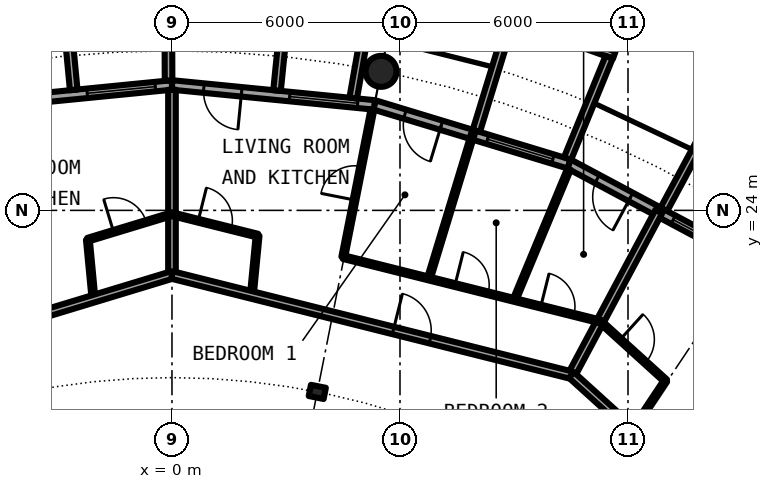
"""IFC4 building model, lengths in metres.
Left out: names, types, materials, properties, quantities, classifications, styles, units other than length and angle.
Written with IfcOpenShell. Run it as: python <this file> out.ifc"""

import sys

from ifc_helpers import new_model, si_unit, direction, frame, frame_2d, origin, origin_2d, place, context, subcontext, project, spatial, rectangle, circle, hollow_circle, i_section, extrude, element, fill, save


model = new_model("IFC4")
c1 = context("Model", 3, precision=1e-05, world=origin(), true_north=direction((0.0, 1.0)))
c2 = subcontext(c1, "Body", "Model", "MODEL_VIEW")
j1 = project(units=[si_unit("LENGTHUNIT", "METRE"), si_unit("PLANEANGLEUNIT", "RADIAN")], contexts=[c1])
p1 = place(None, origin())
s1 = spatial("IfcSite", under=j1, at=p1, CompositionType="ELEMENT")
p2 = place(p1, origin())
s2 = spatial("IfcBuilding", under=s1, at=p2, CompositionType="ELEMENT")
p3 = place(p2, frame((0.0, 0.0, 199.35)))
s3 = spatial("IfcBuildingStorey", under=s2, at=p3, CompositionType="ELEMENT", Elevation=199.35)
p4 = place(p3, frame((5.501, 27.658, 0.0), z_axis=(0.0, 0.0, 1.0), x_axis=(1.0, 0.0, 0.0)))
e1 = element("IfcColumn", 1, at=p4, inside=s3, PredefinedType="COLUMN", context=c2, shape_type="SweptSolid", body=[
    extrude(hollow_circle(Radius=0.406, WallThickness=0.03, at=origin_2d()), origin(), (0.0, 0.0, 1.0), 3.05),
])
p5 = place(p3, frame((3.824, 19.223, 0.0), z_axis=(0.0, 0.0, 1.0), x_axis=(0.195090322016, 0.980785280403, 0.0)))
e2 = element("IfcColumn", 2, at=p5, inside=s3, PredefinedType="COLUMN", context=c2, shape_type="SweptSolid", body=[
    extrude(i_section(OverallWidth=0.3, OverallDepth=0.4, WebThickness=0.013, FlangeThickness=0.024, FilletRadius=0.027, at=origin_2d()), origin(), (0.0, 0.0, 1.0), 3.05),
])
p6 = place(p3, frame((15.167, 22.699, 0.0), z_axis=(0.0, 0.0, 1.0), x_axis=(-0.881915646801, 0.471407246368, 0.0)))
e3 = element("IfcWall", 3, at=p6, inside=s3, PredefinedType="SOLIDWALL", context=c2, shape_type="SweptSolid", body=[
    extrude(rectangle(XDim=5.352, YDim=0.25, at=frame_2d((2.676, 0.0))), origin(), (0.0, 0.0, 1.0), 2.7),
])
p7 = place(p6, frame((0.441, 0.0, 0.3)))
e4 = element("IfcOpeningElement", 4, at=p7, cuts=e3, PredefinedType="OPENING", context=c2, shape_type="SweptSolid", body=[
    extrude(rectangle(XDim=1.8, YDim=2.1, at=frame_2d((0.9, 1.05))), frame((0.0, 0.135, 0.0), z_axis=(0.0, -1.0, 0.0), x_axis=(1.0, 0.0, 0.0)), (0.0, 0.0, 1.0), 0.27),
])
p8 = place(p6, frame((3.51, 0.0, 0.0)))
e5 = element("IfcOpeningElement", 5, at=p8, cuts=e3, PredefinedType="OPENING", context=c2, shape_type="SweptSolid", body=[
    extrude(rectangle(XDim=1.0, YDim=2.2, at=frame_2d((0.5, 1.1))), frame((0.0, 0.135, 0.0), z_axis=(0.0, -1.0, 0.0), x_axis=(1.0, 0.0, 0.0)), (0.0, 0.0, 1.0), 0.27),
])
p9 = place(p3, frame((12.945, 24.029, -0.03), z_axis=(0.0, 0.0, 1.0), x_axis=(0.474424310775, 0.88029629861, 0.0)))
e6 = element("IfcWall", 6, at=p9, inside=s3, PredefinedType="SOLIDWALL", context=c2, shape_type="SweptSolid", body=[
    extrude(rectangle(XDim=3.006, YDim=0.2, at=frame_2d((1.503, 0.0))), origin(), (0.0, 0.0, 1.0), 2.73),
])
p10 = place(p3, frame((10.447, 25.222, 0.0), z_axis=(0.0, 0.0, 1.0), x_axis=(-0.956965678721, 0.290201119486, 0.0)))
e7 = element("IfcWall", 7, at=p10, inside=s3, PredefinedType="SOLIDWALL", context=c2, shape_type="SweptSolid", body=[
    extrude(rectangle(XDim=5.351, YDim=0.25, at=frame_2d((2.676, 0.0))), origin(), (0.0, 0.0, 1.0), 2.7),
])
p11 = place(p10, frame((0.441, 0.0, 0.3)))
e8 = element("IfcOpeningElement", 8, at=p11, cuts=e7, PredefinedType="OPENING", context=c2, shape_type="SweptSolid", body=[
    extrude(rectangle(XDim=1.8, YDim=2.1, at=frame_2d((0.9, 1.05))), frame((0.0, 0.135, 0.0), z_axis=(0.0, -1.0, 0.0), x_axis=(1.0, 0.0, 0.0)), (0.0, 0.0, 1.0), 0.27),
])
p12 = place(p10, frame((3.51, 0.0, 0.0)))
e9 = element("IfcOpeningElement", 9, at=p12, cuts=e7, PredefinedType="OPENING", context=c2, shape_type="SweptSolid", body=[
    extrude(rectangle(XDim=1.0, YDim=2.2, at=frame_2d((0.5, 1.1))), frame((0.0, 0.135, 0.0), z_axis=(0.0, -1.0, 0.0), x_axis=(1.0, 0.0, 0.0)), (0.0, 0.0, 1.0), 0.27),
])
p13 = place(p3, frame((11.638, 28.084, -0.03), z_axis=(0.0, 0.0, 1.0), x_axis=(-0.941461077774, 0.337121697664, 0.0)))
e10 = element("IfcWall", 10, at=p13, inside=s3, PredefinedType="SOLIDWALL", context=c2, shape_type="SweptSolid", body=[
    extrude(rectangle(XDim=2.993, YDim=0.2, at=frame_2d((1.497, 0.0))), origin(), (0.0, 0.0, 1.0), 2.73),
])
p14 = place(p13, frame((0.457, 0.0, 0.33)))
e11 = element("IfcOpeningElement", 11, at=p14, cuts=e10, PredefinedType="OPENING", context=c2, shape_type="SweptSolid", body=[
    extrude(circle(Radius=1.04, at=frame_2d((1.04, 1.04))), frame((0.0, 0.11, 0.0), z_axis=(0.0, -1.0, 0.0), x_axis=(1.0, 0.0, 0.0)), (0.0, 0.0, 1.0), 0.22),
])
p15 = place(p3, frame((10.409, 25.364, -0.03), z_axis=(0.0, 0.0, 1.0), x_axis=(0.379509886562, 0.925187681501, 0.0)))
e12 = element("IfcWall", 12, at=p15, inside=s3, PredefinedType="SOLIDWALL", context=c2, shape_type="SweptSolid", body=[
    extrude(rectangle(XDim=2.883, YDim=0.2, at=frame_2d((1.441, 0.0))), origin(), (0.0, 0.0, 1.0), 2.73),
])
p16 = place(p3, frame((8.009, 26.092, -0.03), z_axis=(0.0, 0.0, 1.0), x_axis=(0.293406695073, 0.955987715029, 0.0)))
e13 = element("IfcWall", 13, at=p16, inside=s3, PredefinedType="SOLIDWALL", context=c2, shape_type="SweptSolid", body=[
    extrude(rectangle(XDim=3.006, YDim=0.2, at=frame_2d((1.503, 0.0))), origin(), (0.0, 0.0, 1.0), 2.73),
])
p17 = place(p3, frame((5.326, 26.775, 0.0), z_axis=(0.0, 0.0, 1.0), x_axis=(-0.995173996315, 0.098126026407, 0.0)))
e14 = element("IfcWall", 14, at=p17, inside=s3, PredefinedType="SOLIDWALL", context=c2, shape_type="SweptSolid", body=[
    extrude(rectangle(XDim=5.352, YDim=0.25, at=frame_2d((2.676, 0.0))), origin(), (0.0, 0.0, 1.0), 2.7),
])
p18 = place(p17, frame((0.441, 0.0, 0.3)))
e15 = element("IfcOpeningElement", 15, at=p18, cuts=e14, PredefinedType="OPENING", context=c2, shape_type="SweptSolid", body=[
    extrude(rectangle(XDim=1.8, YDim=2.1, at=frame_2d((0.9, 1.05))), frame((0.0, 0.135, 0.0), z_axis=(0.0, -1.0, 0.0), x_axis=(1.0, 0.0, 0.0)), (0.0, 0.0, 1.0), 0.27),
])
p19 = place(p17, frame((3.51, 0.0, 0.0)))
e16 = element("IfcOpeningElement", 16, at=p19, cuts=e14, PredefinedType="OPENING", context=c2, shape_type="SweptSolid", body=[
    extrude(rectangle(XDim=1.0, YDim=2.2, at=frame_2d((0.5, 1.1))), frame((0.0, 0.135, 0.0), z_axis=(0.0, -1.0, 0.0), x_axis=(1.0, 0.0, 0.0)), (0.0, 0.0, 1.0), 0.27),
])
p20 = place(p3, frame((4.769, 26.956, -0.03), z_axis=(0.0, 0.0, 1.0), x_axis=(0.174056778901, 0.984735618183, 0.0)))
e17 = element("IfcWall", 17, at=p20, inside=s3, PredefinedType="SOLIDWALL", context=c2, shape_type="SweptSolid", body=[
    extrude(rectangle(XDim=2.925, YDim=0.2, at=frame_2d((1.462, 0.0))), origin(), (0.0, 0.0, 1.0), 2.73),
])
p21 = place(p3, frame((2.764, 27.153, -0.03), z_axis=(0.0, 0.0, 1.0), x_axis=(0.101505487237, 0.994834979311, 0.0)))
e18 = element("IfcWall", 18, at=p21, inside=s3, PredefinedType="SOLIDWALL", context=c2, shape_type="SweptSolid", body=[
    extrude(rectangle(XDim=3.007, YDim=0.2, at=frame_2d((1.503, 0.0))), origin(), (0.0, 0.0, 1.0), 2.73),
])
p22 = place(p3, frame((0.0, 27.3, 0.0), z_axis=(0.0, 0.0, 1.0), x_axis=(-0.995173996315, -0.098126026407, 0.0)))
e19 = element("IfcWall", 19, at=p22, inside=s3, PredefinedType="SOLIDWALL", context=c2, shape_type="SweptSolid", body=[
    extrude(rectangle(XDim=5.352, YDim=0.25, at=frame_2d((2.676, 0.0))), origin(), (0.0, 0.0, 1.0), 2.7),
])
p23 = place(p22, frame((0.441, 0.0, 0.3)))
e20 = element("IfcOpeningElement", 20, at=p23, cuts=e19, PredefinedType="OPENING", context=c2, shape_type="SweptSolid", body=[
    extrude(rectangle(XDim=1.8, YDim=2.1, at=frame_2d((0.9, 1.05))), frame((0.0, 0.135, 0.0), z_axis=(0.0, -1.0, 0.0), x_axis=(1.0, 0.0, 0.0)), (0.0, 0.0, 1.0), 0.27),
])
p24 = place(p22, frame((3.51, 0.0, 0.0)))
e21 = element("IfcOpeningElement", 21, at=p24, cuts=e19, PredefinedType="OPENING", context=c2, shape_type="SweptSolid", body=[
    extrude(rectangle(XDim=1.0, YDim=2.2, at=frame_2d((0.5, 1.1))), frame((0.0, 0.135, 0.0), z_axis=(0.0, -1.0, 0.0), x_axis=(1.0, 0.0, 0.0)), (0.0, 0.0, 1.0), 0.27),
])
p25 = place(p3, frame((-0.09, 27.417, -0.03), z_axis=(0.0, 0.0, 1.0), x_axis=(-0.00347308367, 0.999993968827, 0.0)))
e22 = element("IfcWall", 22, at=p25, inside=s3, PredefinedType="SOLIDWALL", context=c2, shape_type="SweptSolid", body=[
    extrude(rectangle(XDim=2.882, YDim=0.2, at=frame_2d((1.441, 0.0))), origin(), (0.0, 0.0, 1.0), 2.73),
])
p26 = place(p3, frame((-2.586, 27.171, -0.03), z_axis=(0.0, 0.0, 1.0), x_axis=(-0.094548432284, 0.995520262954, 0.0)))
e23 = element("IfcWall", 23, at=p26, inside=s3, PredefinedType="SOLIDWALL", context=c2, shape_type="SweptSolid", body=[
    extrude(rectangle(XDim=3.006, YDim=0.2, at=frame_2d((1.503, 0.0))), origin(), (0.0, 0.0, 1.0), 2.73),
])
p27 = place(p3, frame((-2.213, 23.229, 0.0), z_axis=(0.0, 0.0, 1.0), x_axis=(0.094720578196, -0.995503898569, 0.0)))
e24 = element("IfcWall", 24, at=p27, inside=s3, PredefinedType="PARTITIONING", context=c2, shape_type="SweptSolid", body=[
    extrude(rectangle(XDim=1.562, YDim=0.1, at=frame_2d((0.781, 0.0))), origin(), (0.0, 0.0, 1.0), 2.7),
])
p28 = place(p3, frame((0.0, 22.3, 0.0), z_axis=(0.0, 0.0, 1.0), x_axis=(0.0, 1.0, 0.0)))
e25 = element("IfcWall", 25, at=p28, inside=s3, PredefinedType="PARTITIONING", context=c2, shape_type="SweptSolid", body=[
    extrude(rectangle(XDim=4.875, YDim=0.2, at=frame_2d((2.438, 0.0))), origin(), (0.0, 0.0, 1.0), 2.7),
])
p29 = place(p3, frame((2.102, 21.773, 0.0), z_axis=(0.0, 0.0, 1.0), x_axis=(0.09608568494, 0.995373066317, 0.0)))
e26 = element("IfcWall", 26, at=p29, inside=s3, PredefinedType="PARTITIONING", context=c2, shape_type="SweptSolid", body=[
    extrude(rectangle(XDim=1.57, YDim=0.1, at=frame_2d((0.785, 0.0))), origin(), (0.0, 0.0, 1.0), 2.7),
])
p30 = place(p3, frame((4.507, 22.771, 0.0), z_axis=(0.0, 0.0, 1.0), x_axis=(0.194030211642, 0.980995554001, 0.0)))
e27 = element("IfcWall", 27, at=p30, inside=s3, PredefinedType="PARTITIONING", context=c2, shape_type="SweptSolid", body=[
    extrude(rectangle(XDim=3.962, YDim=0.1, at=frame_2d((1.981, 0.0))), origin(), (0.0, 0.0, 1.0), 2.7),
])
p31 = place(p30, frame((1.531, 0.0, 0.0)))
e28 = element("IfcOpeningElement", 28, at=p31, cuts=e27, PredefinedType="OPENING", context=c2, shape_type="SweptSolid", body=[
    extrude(rectangle(XDim=0.9, YDim=2.3, at=frame_2d((0.45, 1.15))), frame((0.0, 0.06, 0.0), z_axis=(0.0, -1.0, 0.0), x_axis=(1.0, 0.0, 0.0)), (0.0, 0.0, 1.0), 0.12),
])
p32 = place(p3, frame((6.76, 22.207, 0.0), z_axis=(0.0, 0.0, 1.0), x_axis=(0.291291575636, 0.956634317785, 0.0)))
e29 = element("IfcWall", 29, at=p32, inside=s3, PredefinedType="PARTITIONING", context=c2, shape_type="SweptSolid", body=[
    extrude(rectangle(XDim=3.962, YDim=0.1, at=frame_2d((1.981, 0.0))), origin(), (0.0, 0.0, 1.0), 2.7),
])
p33 = place(p3, frame((9.013, 21.642, 0.0), z_axis=(0.0, 0.0, 1.0), x_axis=(0.384420204655, 0.923158223845, 0.0)))
e30 = element("IfcWall", 30, at=p33, inside=s3, PredefinedType="PARTITIONING", context=c2, shape_type="SweptSolid", body=[
    extrude(rectangle(XDim=3.73, YDim=0.1, at=frame_2d((1.865, 0.0))), origin(), (0.0, 0.0, 1.0), 2.7),
])
p34 = place(p3, frame((10.512, 19.667, 0.0), z_axis=(0.0, 0.0, 1.0), x_axis=(0.471271812246, 0.881988026553, 0.0)))
e31 = element("IfcWall", 31, at=p34, inside=s3, PredefinedType="PARTITIONING", context=c2, shape_type="SweptSolid", body=[
    extrude(rectangle(XDim=4.874, YDim=0.2, at=frame_2d((2.437, 0.0))), origin(), (0.0, 0.0, 1.0), 2.7),
])
p35 = place(p3, frame((12.118, 18.211, 0.0), z_axis=(0.0, 0.0, 1.0), x_axis=(0.554125989098, 0.832432813028, 0.0)))
e32 = element("IfcWall", 32, at=p35, inside=s3, PredefinedType="PARTITIONING", context=c2, shape_type="SweptSolid", body=[
    extrude(rectangle(XDim=1.57, YDim=0.1, at=frame_2d((0.785, 0.0))), origin(), (0.0, 0.0, 1.0), 2.7),
])
p36 = place(p3, frame((-12.389, 18.542, 0.0), z_axis=(0.0, 0.0, 1.0), x_axis=(0.956942051091, 0.290279022415, 0.0)))
e33 = element("IfcWall", 33, at=p36, inside=s3, PredefinedType="PARTITIONING", context=c2, shape_type="SweptSolid", body=[
    extrude(rectangle(XDim=12.946, YDim=0.2, at=frame_2d((6.473, 0.0))), origin(), (0.0, 0.0, 1.0), 2.7),
])
p37 = place(p36, frame((4.895, 0.0, 0.0)))
e34 = element("IfcOpeningElement", 34, at=p37, cuts=e33, PredefinedType="OPENING", context=c2, shape_type="SweptSolid", body=[
    extrude(rectangle(XDim=1.0, YDim=2.3, at=frame_2d((0.5, 1.15))), frame((0.0, 0.11, 0.0), z_axis=(0.0, -1.0, 0.0), x_axis=(1.0, 0.0, 0.0)), (0.0, 0.0, 1.0), 0.22),
])
p38 = place(p3, frame((0.0, 22.3, 0.0), z_axis=(0.0, 0.0, 1.0), x_axis=(0.969975381822, -0.243203122222, 0.0)))
e35 = element("IfcWall", 35, at=p38, inside=s3, PredefinedType="PARTITIONING", context=c2, shape_type="SweptSolid", body=[
    extrude(rectangle(XDim=10.843, YDim=0.2, at=frame_2d((5.421, 0.0))), origin(), (0.0, 0.0, 1.0), 2.7),
])
p39 = place(p38, frame((6.002, 0.0, 0.0)))
e36 = element("IfcOpeningElement", 36, at=p39, cuts=e35, PredefinedType="OPENING", context=c2, shape_type="SweptSolid", body=[
    extrude(rectangle(XDim=1.0, YDim=2.3, at=frame_2d((0.5, 1.15))), frame((0.0, 0.11, 0.0), z_axis=(0.0, -1.0, 0.0), x_axis=(1.0, 0.0, 0.0)), (0.0, 0.0, 1.0), 0.22),
])
p40 = place(p3, frame((10.512, 19.667, 0.0), z_axis=(0.0, 0.0, 1.0), x_axis=(0.740849323054, -0.67167125927, 0.0)))
e37 = element("IfcWall", 37, at=p40, inside=s3, PredefinedType="PARTITIONING", context=c2, shape_type="SweptSolid", body=[
    extrude(rectangle(XDim=10.842, YDim=0.2, at=frame_2d((5.421, 0.0))), origin(), (0.0, 0.0, 1.0), 2.7),
])
p41 = place(p40, frame((6.003, 0.0, 0.0)))
e38 = element("IfcOpeningElement", 38, at=p41, cuts=e37, PredefinedType="OPENING", context=c2, shape_type="SweptSolid", body=[
    extrude(rectangle(XDim=1.0, YDim=2.3, at=frame_2d((0.5, 1.15))), frame((0.0, 0.11, 0.0), z_axis=(0.0, -1.0, 0.0), x_axis=(1.0, 0.0, 0.0)), (0.0, 0.0, 1.0), 0.22),
])
p42 = place(p3, frame((-2.216, 23.228, 0.0), z_axis=(0.0, 0.0, 1.0), x_axis=(0.956912517924, 0.290376364464, 0.0)))
e39 = element("IfcWall", 39, at=p42, inside=s3, PredefinedType="PARTITIONING", context=c2, shape_type="SweptSolid", body=[
    extrude(rectangle(XDim=2.314, YDim=0.1, at=frame_2d((1.157, 0.0))), origin(), (0.0, 0.0, 1.0), 2.7),
])
p43 = place(p42, frame((0.71, 0.0, 0.0)))
e40 = element("IfcOpeningElement", 40, at=p43, cuts=e39, PredefinedType="OPENING", context=c2, shape_type="SweptSolid", body=[
    extrude(rectangle(XDim=0.9, YDim=2.3, at=frame_2d((0.45, 1.15))), frame((0.0, 0.06, 0.0), z_axis=(0.0, -1.0, 0.0), x_axis=(1.0, 0.0, 0.0)), (0.0, 0.0, 1.0), 0.12),
])
p44 = place(p3, frame((0.003, 23.899, 0.0), z_axis=(0.0, 0.0, 1.0), x_axis=(0.970074448647, -0.242807668911, 0.0)))
e41 = element("IfcWall", 41, at=p44, inside=s3, PredefinedType="PARTITIONING", context=c2, shape_type="SweptSolid", body=[
    extrude(rectangle(XDim=2.323, YDim=0.1, at=frame_2d((1.161, 0.0))), origin(), (0.0, 0.0, 1.0), 2.7),
])
p45 = place(p44, frame((0.708, 0.0, 0.0)))
e42 = element("IfcOpeningElement", 42, at=p45, cuts=e41, PredefinedType="OPENING", context=c2, shape_type="SweptSolid", body=[
    extrude(rectangle(XDim=0.9, YDim=2.3, at=frame_2d((0.45, 1.15))), frame((0.0, 0.06, 0.0), z_axis=(0.0, -1.0, 0.0), x_axis=(1.0, 0.0, 0.0)), (0.0, 0.0, 1.0), 0.12),
])
p46 = place(p3, frame((4.507, 22.771, 0.0), z_axis=(0.0, 0.0, 1.0), x_axis=(0.970020829306, -0.243021790611, 0.0)))
e43 = element("IfcWall", 43, at=p46, inside=s3, PredefinedType="PARTITIONING", context=c2, shape_type="SweptSolid", body=[
    extrude(rectangle(XDim=6.971, YDim=0.1, at=frame_2d((3.485, 0.0))), origin(), (0.0, 0.0, 1.0), 2.7),
])
p47 = place(p46, frame((3.031, 0.0, 0.0)))
e44 = element("IfcOpeningElement", 44, at=p47, cuts=e43, PredefinedType="OPENING", context=c2, shape_type="SweptSolid", body=[
    extrude(rectangle(XDim=0.9, YDim=2.3, at=frame_2d((0.45, 1.15))), frame((0.0, 0.06, 0.0), z_axis=(0.0, -1.0, 0.0), x_axis=(1.0, 0.0, 0.0)), (0.0, 0.0, 1.0), 0.12),
])
p48 = place(p46, frame((5.358, 0.0, 0.0)))
e45 = element("IfcOpeningElement", 45, at=p48, cuts=e43, PredefinedType="OPENING", context=c2, shape_type="SweptSolid", body=[
    extrude(rectangle(XDim=0.9, YDim=2.3, at=frame_2d((0.45, 1.15))), frame((0.0, 0.06, 0.0), z_axis=(0.0, -1.0, 0.0), x_axis=(1.0, 0.0, 0.0)), (0.0, 0.0, 1.0), 0.12),
])
p49 = place(p3, frame((11.271, 21.074, 0.0), z_axis=(0.0, 0.0, 1.0), x_axis=(0.74087097024, -0.671647381783, 0.0)))
e46 = element("IfcWall", 46, at=p49, inside=s3, PredefinedType="PARTITIONING", context=c2, shape_type="SweptSolid", body=[
    extrude(rectangle(XDim=2.324, YDim=0.1, at=frame_2d((1.162, 0.0))), origin(), (0.0, 0.0, 1.0), 2.7),
])
p50 = place(p49, frame((0.705, 0.0, 0.0)))
e47 = element("IfcOpeningElement", 47, at=p50, cuts=e46, PredefinedType="OPENING", context=c2, shape_type="SweptSolid", body=[
    extrude(rectangle(XDim=0.9, YDim=2.3, at=frame_2d((0.45, 1.15))), frame((0.0, 0.06, 0.0), z_axis=(0.0, -1.0, 0.0), x_axis=(1.0, 0.0, 0.0)), (0.0, 0.0, 1.0), 0.12),
])
p51 = place(p7, origin())
e48 = element("IfcWindow", 48, at=p51, inside=s3, PartitioningType="SINGLE_PANEL", PredefinedType="WINDOW", context=c2, shape_type="SweptSolid", body=[
    extrude(rectangle(XDim=1.8, YDim=2.1, at=frame_2d((0.9, 1.05))), frame((0.0, 0.03, 0.0), z_axis=(0.0, -1.0, 0.0), x_axis=(1.0, 0.0, 0.0)), (0.0, 0.0, 1.0), 0.06),
])
fill(e4, e48)
p52 = place(p8, origin())
e49 = element("IfcDoor", 49, at=p52, inside=s3, OperationType="SINGLE_SWING_LEFT", PredefinedType="DOOR", context=c2, shape_type="SweptSolid", body=[
    extrude(rectangle(XDim=1.0, YDim=2.2, at=frame_2d((0.5, 1.1))), frame((0.0, 0.025, 0.0), z_axis=(0.0, -1.0, 0.0), x_axis=(1.0, 0.0, 0.0)), (0.0, 0.0, 1.0), 0.05),
])
fill(e5, e49)
p53 = place(p11, origin())
e50 = element("IfcWindow", 50, at=p53, inside=s3, PartitioningType="SINGLE_PANEL", PredefinedType="WINDOW", context=c2, shape_type="SweptSolid", body=[
    extrude(rectangle(XDim=1.8, YDim=2.1, at=frame_2d((0.9, 1.05))), frame((0.0, 0.03, 0.0), z_axis=(0.0, -1.0, 0.0), x_axis=(1.0, 0.0, 0.0)), (0.0, 0.0, 1.0), 0.06),
])
fill(e8, e50)
p54 = place(p12, origin())
e51 = element("IfcDoor", 51, at=p54, inside=s3, OperationType="SINGLE_SWING_LEFT", PredefinedType="DOOR", context=c2, shape_type="SweptSolid", body=[
    extrude(rectangle(XDim=1.0, YDim=2.2, at=frame_2d((0.5, 1.1))), frame((0.0, 0.025, 0.0), z_axis=(0.0, -1.0, 0.0), x_axis=(1.0, 0.0, 0.0)), (0.0, 0.0, 1.0), 0.05),
])
fill(e9, e51)
p55 = place(p18, origin())
e52 = element("IfcWindow", 52, at=p55, inside=s3, PartitioningType="SINGLE_PANEL", PredefinedType="WINDOW", context=c2, shape_type="SweptSolid", body=[
    extrude(rectangle(XDim=1.8, YDim=2.1, at=frame_2d((0.9, 1.05))), frame((0.0, 0.03, 0.0), z_axis=(0.0, -1.0, 0.0), x_axis=(1.0, 0.0, 0.0)), (0.0, 0.0, 1.0), 0.06),
])
fill(e15, e52)
p56 = place(p19, origin())
e53 = element("IfcDoor", 53, at=p56, inside=s3, OperationType="SINGLE_SWING_LEFT", PredefinedType="DOOR", context=c2, shape_type="SweptSolid", body=[
    extrude(rectangle(XDim=1.0, YDim=2.2, at=frame_2d((0.5, 1.1))), frame((0.0, 0.025, 0.0), z_axis=(0.0, -1.0, 0.0), x_axis=(1.0, 0.0, 0.0)), (0.0, 0.0, 1.0), 0.05),
])
fill(e16, e53)
p57 = place(p23, origin())
e54 = element("IfcWindow", 54, at=p57, inside=s3, PartitioningType="SINGLE_PANEL", PredefinedType="WINDOW", context=c2, shape_type="SweptSolid", body=[
    extrude(rectangle(XDim=1.8, YDim=2.1, at=frame_2d((0.9, 1.05))), frame((0.0, 0.03, 0.0), z_axis=(0.0, -1.0, 0.0), x_axis=(1.0, 0.0, 0.0)), (0.0, 0.0, 1.0), 0.06),
])
fill(e20, e54)
p58 = place(p50, origin())
e55 = element("IfcDoor", 55, at=p58, inside=s3, OperationType="SINGLE_SWING_LEFT", PredefinedType="DOOR", context=c2, shape_type="SweptSolid", body=[
    extrude(rectangle(XDim=0.9, YDim=2.3, at=frame_2d((0.45, 1.15))), frame((0.0, 0.025, 0.0), z_axis=(0.0, -1.0, 0.0), x_axis=(1.0, 0.0, 0.0)), (0.0, 0.0, 1.0), 0.05),
])
fill(e47, e55)
p59 = place(p39, origin())
e56 = element("IfcDoor", 56, at=p59, inside=s3, OperationType="SINGLE_SWING_RIGHT", PredefinedType="DOOR", context=c2, shape_type="SweptSolid", body=[
    extrude(rectangle(XDim=1.0, YDim=2.3, at=frame_2d((0.5, 1.15))), frame((0.0, 0.025, 0.0), z_axis=(0.0, -1.0, 0.0), x_axis=(1.0, 0.0, 0.0)), (0.0, 0.0, 1.0), 0.05),
])
fill(e36, e56)
p60 = place(p45, origin())
e57 = element("IfcDoor", 57, at=p60, inside=s3, OperationType="SINGLE_SWING_LEFT", PredefinedType="DOOR", context=c2, shape_type="SweptSolid", body=[
    extrude(rectangle(XDim=0.9, YDim=2.3, at=frame_2d((0.45, 1.15))), frame((0.0, 0.025, 0.0), z_axis=(0.0, -1.0, 0.0), x_axis=(1.0, 0.0, 0.0)), (0.0, 0.0, 1.0), 0.05),
])
fill(e42, e57)
p61 = place(p31, origin())
e58 = element("IfcDoor", 58, at=p61, inside=s3, OperationType="SINGLE_SWING_RIGHT", PredefinedType="DOOR", context=c2, shape_type="SweptSolid", body=[
    extrude(rectangle(XDim=0.9, YDim=2.3, at=frame_2d((0.45, 1.15))), frame((0.0, 0.025, 0.0), z_axis=(0.0, -1.0, 0.0), x_axis=(1.0, 0.0, 0.0)), (0.0, 0.0, 1.0), 0.05),
])
fill(e28, e58)
p62 = place(p47, origin())
e59 = element("IfcDoor", 59, at=p62, inside=s3, OperationType="SINGLE_SWING_LEFT", PredefinedType="DOOR", context=c2, shape_type="SweptSolid", body=[
    extrude(rectangle(XDim=0.9, YDim=2.3, at=frame_2d((0.45, 1.15))), frame((0.0, 0.025, 0.0), z_axis=(0.0, -1.0, 0.0), x_axis=(1.0, 0.0, 0.0)), (0.0, 0.0, 1.0), 0.05),
])
fill(e44, e59)
p63 = place(p48, origin())
e60 = element("IfcDoor", 60, at=p63, inside=s3, OperationType="SINGLE_SWING_RIGHT", PredefinedType="DOOR", context=c2, shape_type="SweptSolid", body=[
    extrude(rectangle(XDim=0.9, YDim=2.3, at=frame_2d((0.45, 1.15))), frame((0.0, 0.025, 0.0), z_axis=(0.0, -1.0, 0.0), x_axis=(1.0, 0.0, 0.0)), (0.0, 0.0, 1.0), 0.05),
])
fill(e45, e60)
p64 = place(p43, origin())
e61 = element("IfcDoor", 61, at=p64, inside=s3, OperationType="SINGLE_SWING_RIGHT", PredefinedType="DOOR", context=c2, shape_type="SweptSolid", body=[
    extrude(rectangle(XDim=0.9, YDim=2.3, at=frame_2d((0.45, 1.15))), frame((0.0, 0.025, 0.0), z_axis=(0.0, -1.0, 0.0), x_axis=(1.0, 0.0, 0.0)), (0.0, 0.0, 1.0), 0.05),
])
fill(e40, e61)
save(model, sys.argv[1])
